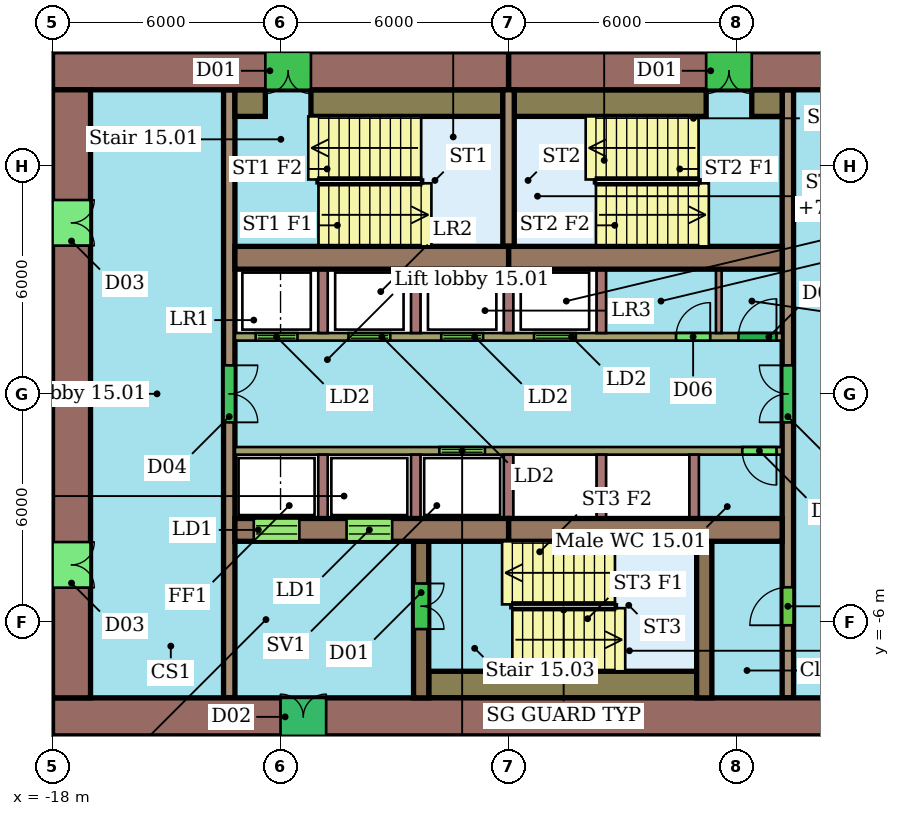
"""IFC4 building model, lengths in metres.
Left out: names, types, materials, properties, quantities, classifications, styles, units other than length and angle.
Written with IfcOpenShell. Run it as: python <this file> out.ifc"""

import sys

from ifc_helpers import new_model, si_unit, direction, frame, frame_2d, origin, place, context, subcontext, project, spatial, rectangle, extrude, element, fill, save


model = new_model("IFC4")
c1 = context("Model", 3, precision=1e-05, world=origin(), true_north=direction((0.0, 1.0)))
c2 = subcontext(c1, "Body", "Model", "MODEL_VIEW")
j1 = project(units=[si_unit("LENGTHUNIT", "METRE"), si_unit("PLANEANGLEUNIT", "RADIAN")], contexts=[c1])
p1 = place(None, origin())
s1 = spatial("IfcSite", under=j1, at=p1, CompositionType="ELEMENT")
p2 = place(p1, origin())
s2 = spatial("IfcBuilding", under=s1, at=p2, CompositionType="ELEMENT")
p3 = place(p2, frame((0.0, 0.0, 73.0)))
s3 = spatial("IfcBuildingStorey", under=s2, at=p3, CompositionType="ELEMENT", Elevation=73.0)
p4 = place(p3, frame((6.0, 8.5, 0.0), z_axis=(0.0, 0.0, 1.0), x_axis=(-1.0, 0.0, 0.0)))
e1 = element("IfcWall", 1, at=p4, inside=s3, PredefinedType="SHEAR", context=c2, shape_type="SweptSolid", body=[
    extrude(rectangle(XDim=12.0, YDim=1.0, at=frame_2d((6.0, 0.0))), origin(), (0.0, 0.0, 1.0), 3.4),
])
p5 = place(p4, frame((5.6, 0.0, 0.0)))
e2 = element("IfcOpeningElement", 2, at=p5, cuts=e1, PredefinedType="OPENING", context=c2, shape_type="SweptSolid", body=[
    extrude(rectangle(XDim=1.2, YDim=2.1, at=frame_2d((0.6, 1.05))), frame((0.0, 0.51, 0.0), z_axis=(0.0, -1.0, 0.0), x_axis=(1.0, 0.0, 0.0)), (0.0, 0.0, 1.0), 1.02),
])
p6 = place(p3, frame((-6.0, 8.5, 0.0), z_axis=(0.0, 0.0, 1.0), x_axis=(-1.0, 0.0, 0.0)))
e3 = element("IfcWall", 3, at=p6, inside=s3, PredefinedType="SHEAR", context=c2, shape_type="SweptSolid", body=[
    extrude(rectangle(XDim=12.0, YDim=1.0, at=frame_2d((6.0, 0.0))), origin(), (0.0, 0.0, 1.0), 3.4),
])
p7 = place(p6, frame((5.2, 0.0, 0.0)))
e4 = element("IfcOpeningElement", 4, at=p7, cuts=e3, PredefinedType="OPENING", context=c2, shape_type="SweptSolid", body=[
    extrude(rectangle(XDim=1.2, YDim=2.1, at=frame_2d((0.6, 1.05))), frame((0.0, 0.51, 0.0), z_axis=(0.0, -1.0, 0.0), x_axis=(1.0, 0.0, 0.0)), (0.0, 0.0, 1.0), 1.02),
])
p8 = place(p3, frame((-18.0, -8.5, 0.0), z_axis=(0.0, 0.0, 1.0), x_axis=(1.0, 0.0, 0.0)))
e5 = element("IfcWall", 5, at=p8, inside=s3, PredefinedType="SHEAR", context=c2, shape_type="SweptSolid", body=[
    extrude(rectangle(XDim=24.0, YDim=1.0, at=frame_2d((12.0, 0.0))), origin(), (0.0, 0.0, 1.0), 3.4),
])
p9 = place(p8, frame((6.0, 0.0, 0.0)))
e6 = element("IfcOpeningElement", 6, at=p9, cuts=e5, PredefinedType="OPENING", context=c2, shape_type="SweptSolid", body=[
    extrude(rectangle(XDim=1.2, YDim=2.1, at=frame_2d((0.6, 1.05))), frame((0.0, 0.51, 0.0), z_axis=(0.0, -1.0, 0.0), x_axis=(1.0, 0.0, 0.0)), (0.0, 0.0, 1.0), 1.02),
])
p10 = place(p3, frame((-17.5, 8.0, 0.0), z_axis=(0.0, 0.0, 1.0), x_axis=(0.0, -1.0, 0.0)))
e7 = element("IfcWall", 7, at=p10, inside=s3, PredefinedType="SHEAR", context=c2, shape_type="SweptSolid", body=[
    extrude(rectangle(XDim=16.0, YDim=1.0, at=frame_2d((8.0, 0.0))), origin(), (0.0, 0.0, 1.0), 3.4),
])
p11 = place(p10, frame((11.9, 0.0, 0.0)))
e8 = element("IfcOpeningElement", 8, at=p11, cuts=e7, PredefinedType="OPENING", context=c2, shape_type="SweptSolid", body=[
    extrude(rectangle(XDim=1.2, YDim=2.1, at=frame_2d((0.6, 1.05))), frame((0.0, 0.51, 0.0), z_axis=(0.0, -1.0, 0.0), x_axis=(1.0, 0.0, 0.0)), (0.0, 0.0, 1.0), 1.02),
])
p12 = place(p10, frame((2.9, 0.0, 0.0)))
e9 = element("IfcOpeningElement", 9, at=p12, cuts=e7, PredefinedType="OPENING", context=c2, shape_type="SweptSolid", body=[
    extrude(rectangle(XDim=1.2, YDim=2.1, at=frame_2d((0.6, 1.05))), frame((0.0, 0.51, 0.0), z_axis=(0.0, -1.0, 0.0), x_axis=(1.0, 0.0, 0.0)), (0.0, 0.0, 1.0), 1.02),
])
for number, where, z_axis, x_axis in (
    (10, (-13.2, 3.58, 0.0), (0.0, 0.0, 1.0), (1.0, 0.0, 0.0)),
    (11, (-6.0, 3.58, 0.0), (0.0, 0.0, 1.0), (1.0, 0.0, 0.0)),
):
    element("IfcWall", number, at=place(p3, frame(where, z_axis=z_axis, x_axis=x_axis)), inside=s3, PredefinedType="SHEAR", context=c2, shape_type="SweptSolid", body=[
        extrude(rectangle(XDim=7.2, YDim=0.6, at=frame_2d((3.6, 0.0))), origin(), (0.0, 0.0, 1.0), 3.4),
    ])
p13 = place(p3, frame((-13.2, -3.58, 0.0), z_axis=(0.0, 0.0, 1.0), x_axis=(1.0, 0.0, 0.0)))
e12 = element("IfcWall", 12, at=p13, inside=s3, PredefinedType="SHEAR", context=c2, shape_type="SweptSolid", body=[
    extrude(rectangle(XDim=7.2, YDim=0.6, at=frame_2d((3.6, 0.0))), origin(), (0.0, 0.0, 1.0), 3.4),
])
p14 = place(p13, frame((0.496, 0.0, 0.0)))
e13 = element("IfcOpeningElement", 13, at=p14, cuts=e12, PredefinedType="OPENING", context=c2, shape_type="SweptSolid", body=[
    extrude(rectangle(XDim=1.2, YDim=2.1, at=frame_2d((0.6, 1.05))), frame((0.0, 0.31, 0.0), z_axis=(0.0, -1.0, 0.0), x_axis=(1.0, 0.0, 0.0)), (0.0, 0.0, 1.0), 0.62),
])
p15 = place(p13, frame((2.938, 0.0, 0.0)))
e14 = element("IfcOpeningElement", 14, at=p15, cuts=e12, PredefinedType="OPENING", context=c2, shape_type="SweptSolid", body=[
    extrude(rectangle(XDim=1.2, YDim=2.1, at=frame_2d((0.6, 1.05))), frame((0.0, 0.31, 0.0), z_axis=(0.0, -1.0, 0.0), x_axis=(1.0, 0.0, 0.0)), (0.0, 0.0, 1.0), 0.62),
])
p16 = place(p3, frame((-6.0, -3.58, 0.0), z_axis=(0.0, 0.0, 1.0), x_axis=(1.0, 0.0, 0.0)))
e15 = element("IfcWall", 15, at=p16, inside=s3, PredefinedType="SHEAR", context=c2, shape_type="SweptSolid", body=[
    extrude(rectangle(XDim=7.2, YDim=0.6, at=frame_2d((3.6, 0.0))), origin(), (0.0, 0.0, 1.0), 3.4),
])
p17 = place(p3, frame((-13.35, 8.0, 0.0), z_axis=(0.0, 0.0, 1.0), x_axis=(0.0, -1.0, 0.0)))
e16 = element("IfcWall", 16, at=p17, inside=s3, PredefinedType="SHEAR", context=c2, shape_type="SweptSolid", body=[
    extrude(rectangle(XDim=16.0, YDim=0.3, at=frame_2d((8.0, 0.0))), origin(), (0.0, 0.0, 1.0), 3.4),
])
p18 = place(p17, frame((7.25, 0.0, 0.0)))
e17 = element("IfcOpeningElement", 17, at=p18, cuts=e16, PredefinedType="OPENING", context=c2, shape_type="SweptSolid", body=[
    extrude(rectangle(XDim=1.5, YDim=2.1, at=frame_2d((0.75, 1.05))), frame((0.0, 0.16, 0.0), z_axis=(0.0, -1.0, 0.0), x_axis=(1.0, 0.0, 0.0)), (0.0, 0.0, 1.0), 0.32),
])
p19 = place(p3, frame((1.35, -8.0, 0.0), z_axis=(0.0, 0.0, 1.0), x_axis=(0.0, 1.0, 0.0)))
e18 = element("IfcWall", 18, at=p19, inside=s3, PredefinedType="SHEAR", context=c2, shape_type="SweptSolid", body=[
    extrude(rectangle(XDim=16.0, YDim=0.3, at=frame_2d((8.0, 0.0))), origin(), (0.0, 0.0, 1.0), 3.4),
])
p20 = place(p19, frame((1.91, 0.0, 0.0)))
e19 = element("IfcOpeningElement", 19, at=p20, cuts=e18, PredefinedType="OPENING", context=c2, shape_type="SweptSolid", body=[
    extrude(rectangle(XDim=1.0, YDim=2.1, at=frame_2d((0.5, 1.05))), frame((0.0, 0.16, 0.0), z_axis=(0.0, -1.0, 0.0), x_axis=(1.0, 0.0, 0.0)), (0.0, 0.0, 1.0), 0.32),
])
p21 = place(p19, frame((7.25, 0.0, 0.0)))
e20 = element("IfcOpeningElement", 20, at=p21, cuts=e18, PredefinedType="OPENING", context=c2, shape_type="SweptSolid", body=[
    extrude(rectangle(XDim=1.5, YDim=2.1, at=frame_2d((0.75, 1.05))), frame((0.0, 0.16, 0.0), z_axis=(0.0, -1.0, 0.0), x_axis=(1.0, 0.0, 0.0)), (0.0, 0.0, 1.0), 0.32),
])
p22 = place(p3, frame((-13.2, 1.5, 0.0), z_axis=(0.0, 0.0, 1.0), x_axis=(1.0, 0.0, 0.0)))
e21 = element("IfcWall", 21, at=p22, inside=s3, PredefinedType="SHEAR", context=c2, shape_type="SweptSolid", body=[
    extrude(rectangle(XDim=14.4, YDim=0.2, at=frame_2d((7.2, 0.0))), origin(), (0.0, 0.0, 1.0), 3.4),
])
p23 = place(p22, frame((0.546, 0.0, 0.0)))
e22 = element("IfcOpeningElement", 22, at=p23, cuts=e21, PredefinedType="OPENING", context=c2, shape_type="SweptSolid", body=[
    extrude(rectangle(XDim=1.1, YDim=2.1, at=frame_2d((0.55, 1.05))), frame((0.0, 0.11, 0.0), z_axis=(0.0, -1.0, 0.0), x_axis=(1.0, 0.0, 0.0)), (0.0, 0.0, 1.0), 0.22),
])
p24 = place(p22, frame((2.988, 0.0, 0.0)))
e23 = element("IfcOpeningElement", 23, at=p24, cuts=e21, PredefinedType="OPENING", context=c2, shape_type="SweptSolid", body=[
    extrude(rectangle(XDim=1.1, YDim=2.1, at=frame_2d((0.55, 1.05))), frame((0.0, 0.11, 0.0), z_axis=(0.0, -1.0, 0.0), x_axis=(1.0, 0.0, 0.0)), (0.0, 0.0, 1.0), 0.22),
])
p25 = place(p22, frame((5.429, 0.0, 0.0)))
e24 = element("IfcOpeningElement", 24, at=p25, cuts=e21, PredefinedType="OPENING", context=c2, shape_type="SweptSolid", body=[
    extrude(rectangle(XDim=1.1, YDim=2.1, at=frame_2d((0.55, 1.05))), frame((0.0, 0.11, 0.0), z_axis=(0.0, -1.0, 0.0), x_axis=(1.0, 0.0, 0.0)), (0.0, 0.0, 1.0), 0.22),
])
p26 = place(p22, frame((7.871, 0.0, 0.0)))
e25 = element("IfcOpeningElement", 25, at=p26, cuts=e21, PredefinedType="OPENING", context=c2, shape_type="SweptSolid", body=[
    extrude(rectangle(XDim=1.1, YDim=2.1, at=frame_2d((0.55, 1.05))), frame((0.0, 0.11, 0.0), z_axis=(0.0, -1.0, 0.0), x_axis=(1.0, 0.0, 0.0)), (0.0, 0.0, 1.0), 0.22),
])
p27 = place(p22, frame((11.607, 0.0, 0.0)))
e26 = element("IfcOpeningElement", 26, at=p27, cuts=e21, PredefinedType="OPENING", context=c2, shape_type="SweptSolid", body=[
    extrude(rectangle(XDim=0.9, YDim=2.1, at=frame_2d((0.45, 1.05))), frame((0.0, 0.11, 0.0), z_axis=(0.0, -1.0, 0.0), x_axis=(1.0, 0.0, 0.0)), (0.0, 0.0, 1.0), 0.22),
])
p28 = place(p22, frame((13.25, 0.0, 0.0)))
e27 = element("IfcOpeningElement", 27, at=p28, cuts=e21, PredefinedType="OPENING", context=c2, shape_type="SweptSolid", body=[
    extrude(rectangle(XDim=1.0, YDim=2.1, at=frame_2d((0.5, 1.05))), frame((0.0, 0.11, 0.0), z_axis=(0.0, -1.0, 0.0), x_axis=(1.0, 0.0, 0.0)), (0.0, 0.0, 1.0), 0.22),
])
p29 = place(p3, frame((1.2, -1.5, 0.0), z_axis=(0.0, 0.0, 1.0), x_axis=(-1.0, 0.0, 0.0)))
e28 = element("IfcWall", 28, at=p29, inside=s3, PredefinedType="SHEAR", context=c2, shape_type="SweptSolid", body=[
    extrude(rectangle(XDim=14.4, YDim=0.2, at=frame_2d((7.2, 0.0))), origin(), (0.0, 0.0, 1.0), 3.4),
])
p30 = place(p29, frame((7.821, 0.0, 0.0)))
e29 = element("IfcOpeningElement", 29, at=p30, cuts=e28, PredefinedType="OPENING", context=c2, shape_type="SweptSolid", body=[
    extrude(rectangle(XDim=1.2, YDim=2.1, at=frame_2d((0.6, 1.05))), frame((0.0, 0.11, 0.0), z_axis=(0.0, -1.0, 0.0), x_axis=(1.0, 0.0, 0.0)), (0.0, 0.0, 1.0), 0.22),
])
p31 = place(p29, frame((0.15, 0.0, 0.0)))
e30 = element("IfcOpeningElement", 30, at=p31, cuts=e28, PredefinedType="OPENING", context=c2, shape_type="SweptSolid", body=[
    extrude(rectangle(XDim=0.9, YDim=2.1, at=frame_2d((0.45, 1.05))), frame((0.0, 0.11, 0.0), z_axis=(0.0, -1.0, 0.0), x_axis=(1.0, 0.0, 0.0)), (0.0, 0.0, 1.0), 0.22),
])
p32 = place(p3, frame((-8.3, -3.88, 0.0), z_axis=(0.0, 0.0, 1.0), x_axis=(0.0, -1.0, 0.0)))
e31 = element("IfcWall", 31, at=p32, inside=s3, PredefinedType="SHEAR", context=c2, shape_type="SweptSolid", body=[
    extrude(rectangle(XDim=4.12, YDim=0.4, at=frame_2d((2.06, 0.0))), origin(), (0.0, 0.0, 1.0), 3.4),
])
p33 = place(p32, frame((1.11, 0.0, 0.0)))
e32 = element("IfcOpeningElement", 32, at=p33, cuts=e31, PredefinedType="OPENING", context=c2, shape_type="SweptSolid", body=[
    extrude(rectangle(XDim=1.2, YDim=2.1, at=frame_2d((0.6, 1.05))), frame((0.0, 0.21, 0.0), z_axis=(0.0, -1.0, 0.0), x_axis=(1.0, 0.0, 0.0)), (0.0, 0.0, 1.0), 0.42),
])
p34 = place(p3, frame((-0.85, -3.88, 0.0), z_axis=(0.0, 0.0, 1.0), x_axis=(0.0, -1.0, 0.0)))
e33 = element("IfcWall", 33, at=p34, inside=s3, PredefinedType="SHEAR", context=c2, shape_type="SweptSolid", body=[
    extrude(rectangle(XDim=4.12, YDim=0.4, at=frame_2d((2.06, 0.0))), origin(), (0.0, 0.0, 1.0), 3.4),
])
p35 = place(p3, frame((-6.0, 3.88, 0.0), z_axis=(0.0, 0.0, 1.0), x_axis=(0.0, 1.0, 0.0)))
e34 = element("IfcWall", 34, at=p35, inside=s3, PredefinedType="SHEAR", context=c2, shape_type="SweptSolid", body=[
    extrude(rectangle(XDim=4.12, YDim=0.3, at=frame_2d((2.06, 0.0))), origin(), (0.0, 0.0, 1.0), 3.4),
])
p36 = place(p3, frame((-13.2, 7.65, 0.0), z_axis=(0.0, 0.0, 1.0), x_axis=(1.0, 0.0, 0.0)))
e35 = element("IfcWall", 35, at=p36, inside=s3, PredefinedType="SHEAR", context=c2, shape_type="SweptSolid", body=[
    extrude(rectangle(XDim=0.8, YDim=0.7, at=frame_2d((0.4, 0.0))), origin(), (0.0, 0.0, 1.0), 3.4),
])
for number, where, z_axis, x_axis in (
    (36, (-11.2, 7.65, 0.0), (0.0, 0.0, 1.0), (1.0, 0.0, 0.0)),
    (37, (-5.85, 7.65, 0.0), (0.0, 0.0, 1.0), (1.0, 0.0, 0.0)),
):
    element("IfcWall", number, at=place(p3, frame(where, z_axis=z_axis, x_axis=x_axis)), inside=s3, PredefinedType="SHEAR", context=c2, shape_type="SweptSolid", body=[
        extrude(rectangle(XDim=5.05, YDim=0.7, at=frame_2d((2.525, 0.0))), origin(), (0.0, 0.0, 1.0), 3.4),
    ])
p37 = place(p3, frame((0.4, 7.65, 0.0), z_axis=(0.0, 0.0, 1.0), x_axis=(1.0, 0.0, 0.0)))
e38 = element("IfcWall", 38, at=p37, inside=s3, PredefinedType="SHEAR", context=c2, shape_type="SweptSolid", body=[
    extrude(rectangle(XDim=0.8, YDim=0.7, at=frame_2d((0.4, 0.0))), origin(), (0.0, 0.0, 1.0), 3.4),
])
p38 = place(p3, frame((-8.1, -7.65, 0.0), z_axis=(0.0, 0.0, 1.0), x_axis=(1.0, 0.0, 0.0)))
e39 = element("IfcWall", 39, at=p38, inside=s3, PredefinedType="SHEAR", context=c2, shape_type="SweptSolid", body=[
    extrude(rectangle(XDim=7.05, YDim=0.7, at=frame_2d((3.525, 0.0))), origin(), (0.0, 0.0, 1.0), 3.4),
])
for number, where, z_axis, x_axis in (
    (40, (-10.883, 1.6, 0.0), (0.0, 0.0, 1.0), (0.0, 1.0, 0.0)),
    (41, (-8.442, 1.6, 0.0), (0.0, 0.0, 1.0), (0.0, 1.0, 0.0)),
    (42, (-6.0, 1.6, 0.0), (0.0, 0.0, 1.0), (0.0, 1.0, 0.0)),
    (43, (-3.558, 1.6, 0.0), (0.0, 0.0, 1.0), (0.0, 1.0, 0.0)),
):
    element("IfcWall", number, at=place(p3, frame(where, z_axis=z_axis, x_axis=x_axis)), inside=s3, PredefinedType="SHEAR", context=c2, shape_type="SweptSolid", body=[
        extrude(rectangle(XDim=1.68, YDim=0.25, at=frame_2d((0.84, 0.0))), origin(), (0.0, 0.0, 1.0), 3.4),
    ])
p39 = place(p3, frame((-0.468, 1.6, 0.0), z_axis=(0.0, 0.0, 1.0), x_axis=(0.0, 1.0, 0.0)))
e44 = element("IfcWall", 44, at=p39, inside=s3, PredefinedType="PARTITIONING", context=c2, shape_type="SweptSolid", body=[
    extrude(rectangle(XDim=1.68, YDim=0.15, at=frame_2d((0.84, 0.0))), origin(), (0.0, 0.0, 1.0), 3.4),
])
for number, where, z_axis, x_axis in (
    (45, (-10.883, -1.6, 0.0), (0.0, 0.0, 1.0), (0.0, -1.0, 0.0)),
    (46, (-8.442, -1.6, 0.0), (0.0, 0.0, 1.0), (0.0, -1.0, 0.0)),
    (47, (-6.0, -1.6, 0.0), (0.0, 0.0, 1.0), (0.0, -1.0, 0.0)),
    (48, (-3.558, -1.6, 0.0), (0.0, 0.0, 1.0), (0.0, -1.0, 0.0)),
    (49, (-1.117, -1.6, 0.0), (0.0, 0.0, 1.0), (0.0, -1.0, 0.0)),
):
    element("IfcWall", number, at=place(p3, frame(where, z_axis=z_axis, x_axis=x_axis)), inside=s3, PredefinedType="SHEAR", context=c2, shape_type="SweptSolid", body=[
        extrude(rectangle(XDim=1.68, YDim=0.25, at=frame_2d((0.84, 0.0))), origin(), (0.0, 0.0, 1.0), 3.4),
    ])
p40 = place(p5, origin())
e50 = element("IfcDoor", 50, at=p40, inside=s3, OperationType="DOUBLE_DOOR_SINGLE_SWING", PredefinedType="NOTDEFINED", context=c2, shape_type="SweptSolid", body=[
    extrude(rectangle(XDim=1.2, YDim=2.1, at=frame_2d((0.6, 1.05))), frame((0.0, 0.025, 0.0), z_axis=(0.0, -1.0, 0.0), x_axis=(1.0, 0.0, 0.0)), (0.0, 0.0, 1.0), 0.05),
])
fill(e2, e50)
p41 = place(p7, origin())
e51 = element("IfcDoor", 51, at=p41, inside=s3, OperationType="DOUBLE_DOOR_SINGLE_SWING", PredefinedType="NOTDEFINED", context=c2, shape_type="SweptSolid", body=[
    extrude(rectangle(XDim=1.2, YDim=2.1, at=frame_2d((0.6, 1.05))), frame((0.0, 0.025, 0.0), z_axis=(0.0, -1.0, 0.0), x_axis=(1.0, 0.0, 0.0)), (0.0, 0.0, 1.0), 0.05),
])
fill(e4, e51)
p42 = place(p9, origin())
e52 = element("IfcDoor", 52, at=p42, inside=s3, OperationType="DOUBLE_DOOR_SINGLE_SWING", PredefinedType="NOTDEFINED", context=c2, shape_type="SweptSolid", body=[
    extrude(rectangle(XDim=1.2, YDim=2.1, at=frame_2d((0.6, 1.05))), frame((0.0, 0.025, 0.0), z_axis=(0.0, -1.0, 0.0), x_axis=(1.0, 0.0, 0.0)), (0.0, 0.0, 1.0), 0.05),
])
fill(e6, e52)
p43 = place(p11, origin())
e53 = element("IfcDoor", 53, at=p43, inside=s3, OperationType="DOUBLE_DOOR_SINGLE_SWING", PredefinedType="NOTDEFINED", context=c2, shape_type="SweptSolid", body=[
    extrude(rectangle(XDim=1.2, YDim=2.1, at=frame_2d((0.6, 1.05))), frame((0.0, 0.025, 0.0), z_axis=(0.0, -1.0, 0.0), x_axis=(1.0, 0.0, 0.0)), (0.0, 0.0, 1.0), 0.05),
])
fill(e8, e53)
p44 = place(p12, origin())
e54 = element("IfcDoor", 54, at=p44, inside=s3, OperationType="DOUBLE_DOOR_SINGLE_SWING", PredefinedType="NOTDEFINED", context=c2, shape_type="SweptSolid", body=[
    extrude(rectangle(XDim=1.2, YDim=2.1, at=frame_2d((0.6, 1.05))), frame((0.0, 0.025, 0.0), z_axis=(0.0, -1.0, 0.0), x_axis=(1.0, 0.0, 0.0)), (0.0, 0.0, 1.0), 0.05),
])
fill(e9, e54)
p45 = place(p14, origin())
e55 = element("IfcDoor", 55, at=p45, inside=s3, OperationType="DOUBLE_DOOR_SLIDING", PredefinedType="NOTDEFINED", context=c2, shape_type="SweptSolid", body=[
    extrude(rectangle(XDim=1.2, YDim=2.1, at=frame_2d((0.6, 1.05))), frame((0.0, 0.025, 0.0), z_axis=(0.0, -1.0, 0.0), x_axis=(1.0, 0.0, 0.0)), (0.0, 0.0, 1.0), 0.05),
])
fill(e13, e55)
p46 = place(p15, origin())
e56 = element("IfcDoor", 56, at=p46, inside=s3, OperationType="DOUBLE_DOOR_SLIDING", PredefinedType="NOTDEFINED", context=c2, shape_type="SweptSolid", body=[
    extrude(rectangle(XDim=1.2, YDim=2.1, at=frame_2d((0.6, 1.05))), frame((0.0, 0.025, 0.0), z_axis=(0.0, -1.0, 0.0), x_axis=(1.0, 0.0, 0.0)), (0.0, 0.0, 1.0), 0.05),
])
fill(e14, e56)
p47 = place(p18, origin())
e57 = element("IfcDoor", 57, at=p47, inside=s3, OperationType="DOUBLE_DOOR_SINGLE_SWING", PredefinedType="NOTDEFINED", context=c2, shape_type="SweptSolid", body=[
    extrude(rectangle(XDim=1.5, YDim=2.1, at=frame_2d((0.75, 1.05))), frame((0.0, 0.025, 0.0), z_axis=(0.0, -1.0, 0.0), x_axis=(1.0, 0.0, 0.0)), (0.0, 0.0, 1.0), 0.05),
])
fill(e17, e57)
p48 = place(p20, origin())
e58 = element("IfcDoor", 58, at=p48, inside=s3, OperationType="SINGLE_SWING_LEFT", PredefinedType="NOTDEFINED", context=c2, shape_type="SweptSolid", body=[
    extrude(rectangle(XDim=1.0, YDim=2.1, at=frame_2d((0.5, 1.05))), frame((0.0, 0.025, 0.0), z_axis=(0.0, -1.0, 0.0), x_axis=(1.0, 0.0, 0.0)), (0.0, 0.0, 1.0), 0.05),
])
fill(e19, e58)
p49 = place(p21, origin())
e59 = element("IfcDoor", 59, at=p49, inside=s3, OperationType="DOUBLE_DOOR_SINGLE_SWING", PredefinedType="NOTDEFINED", context=c2, shape_type="SweptSolid", body=[
    extrude(rectangle(XDim=1.5, YDim=2.1, at=frame_2d((0.75, 1.05))), frame((0.0, 0.025, 0.0), z_axis=(0.0, -1.0, 0.0), x_axis=(1.0, 0.0, 0.0)), (0.0, 0.0, 1.0), 0.05),
])
fill(e20, e59)
p50 = place(p23, origin())
e60 = element("IfcDoor", 60, at=p50, inside=s3, OperationType="DOUBLE_DOOR_SLIDING", PredefinedType="NOTDEFINED", context=c2, shape_type="SweptSolid", body=[
    extrude(rectangle(XDim=1.1, YDim=2.1, at=frame_2d((0.55, 1.05))), frame((0.0, 0.025, 0.0), z_axis=(0.0, -1.0, 0.0), x_axis=(1.0, 0.0, 0.0)), (0.0, 0.0, 1.0), 0.05),
])
fill(e22, e60)
p51 = place(p24, origin())
e61 = element("IfcDoor", 61, at=p51, inside=s3, OperationType="DOUBLE_DOOR_SLIDING", PredefinedType="NOTDEFINED", context=c2, shape_type="SweptSolid", body=[
    extrude(rectangle(XDim=1.1, YDim=2.1, at=frame_2d((0.55, 1.05))), frame((0.0, 0.025, 0.0), z_axis=(0.0, -1.0, 0.0), x_axis=(1.0, 0.0, 0.0)), (0.0, 0.0, 1.0), 0.05),
])
fill(e23, e61)
p52 = place(p25, origin())
e62 = element("IfcDoor", 62, at=p52, inside=s3, OperationType="DOUBLE_DOOR_SLIDING", PredefinedType="NOTDEFINED", context=c2, shape_type="SweptSolid", body=[
    extrude(rectangle(XDim=1.1, YDim=2.1, at=frame_2d((0.55, 1.05))), frame((0.0, 0.025, 0.0), z_axis=(0.0, -1.0, 0.0), x_axis=(1.0, 0.0, 0.0)), (0.0, 0.0, 1.0), 0.05),
])
fill(e24, e62)
p53 = place(p26, origin())
e63 = element("IfcDoor", 63, at=p53, inside=s3, OperationType="DOUBLE_DOOR_SLIDING", PredefinedType="NOTDEFINED", context=c2, shape_type="SweptSolid", body=[
    extrude(rectangle(XDim=1.1, YDim=2.1, at=frame_2d((0.55, 1.05))), frame((0.0, 0.025, 0.0), z_axis=(0.0, -1.0, 0.0), x_axis=(1.0, 0.0, 0.0)), (0.0, 0.0, 1.0), 0.05),
])
fill(e25, e63)
p54 = place(p27, origin())
e64 = element("IfcDoor", 64, at=p54, inside=s3, OperationType="SINGLE_SWING_RIGHT", PredefinedType="NOTDEFINED", context=c2, shape_type="SweptSolid", body=[
    extrude(rectangle(XDim=0.9, YDim=2.1, at=frame_2d((0.45, 1.05))), frame((0.0, 0.025, 0.0), z_axis=(0.0, -1.0, 0.0), x_axis=(1.0, 0.0, 0.0)), (0.0, 0.0, 1.0), 0.05),
])
fill(e26, e64)
p55 = place(p28, origin())
e65 = element("IfcDoor", 65, at=p55, inside=s3, OperationType="SINGLE_SWING_RIGHT", PredefinedType="NOTDEFINED", context=c2, shape_type="SweptSolid", body=[
    extrude(rectangle(XDim=1.0, YDim=2.1, at=frame_2d((0.5, 1.05))), frame((0.0, 0.025, 0.0), z_axis=(0.0, -1.0, 0.0), x_axis=(1.0, 0.0, 0.0)), (0.0, 0.0, 1.0), 0.05),
])
fill(e27, e65)
p56 = place(p30, origin())
e66 = element("IfcDoor", 66, at=p56, inside=s3, OperationType="DOUBLE_DOOR_SLIDING", PredefinedType="NOTDEFINED", context=c2, shape_type="SweptSolid", body=[
    extrude(rectangle(XDim=1.2, YDim=2.1, at=frame_2d((0.6, 1.05))), frame((0.0, 0.025, 0.0), z_axis=(0.0, -1.0, 0.0), x_axis=(1.0, 0.0, 0.0)), (0.0, 0.0, 1.0), 0.05),
])
fill(e29, e66)
p57 = place(p31, origin())
e67 = element("IfcDoor", 67, at=p57, inside=s3, OperationType="SINGLE_SWING_LEFT", PredefinedType="NOTDEFINED", context=c2, shape_type="SweptSolid", body=[
    extrude(rectangle(XDim=0.9, YDim=2.1, at=frame_2d((0.45, 1.05))), frame((0.0, 0.025, 0.0), z_axis=(0.0, -1.0, 0.0), x_axis=(1.0, 0.0, 0.0)), (0.0, 0.0, 1.0), 0.05),
])
fill(e30, e67)
p58 = place(p33, origin())
e68 = element("IfcDoor", 68, at=p58, inside=s3, OperationType="DOUBLE_DOOR_SINGLE_SWING", PredefinedType="NOTDEFINED", context=c2, shape_type="SweptSolid", body=[
    extrude(rectangle(XDim=1.2, YDim=2.1, at=frame_2d((0.6, 1.05))), frame((0.0, 0.025, 0.0), z_axis=(0.0, -1.0, 0.0), x_axis=(1.0, 0.0, 0.0)), (0.0, 0.0, 1.0), 0.05),
])
fill(e32, e68)
save(model, sys.argv[1])
